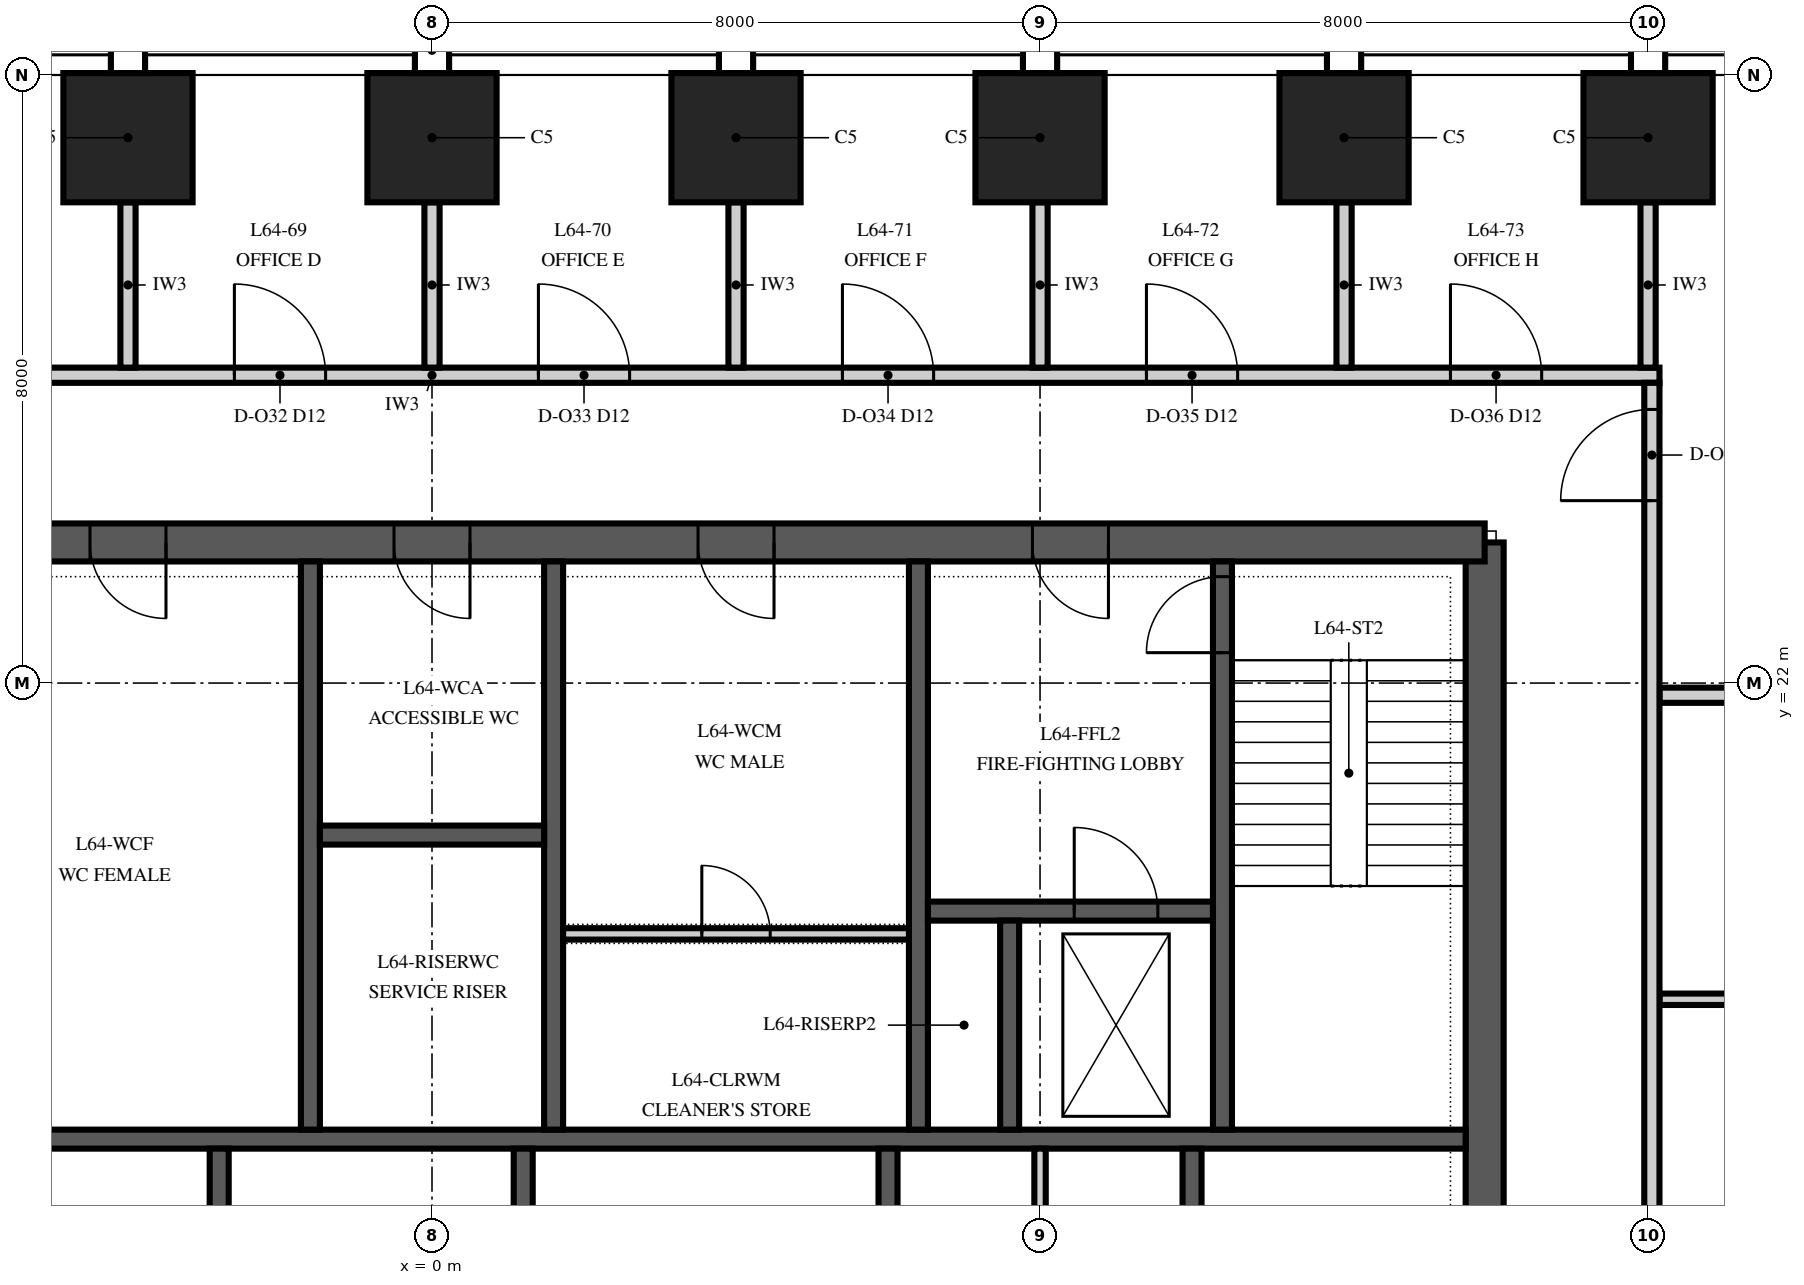
"""IFC4 building model, lengths in metres.
Left out: names, types, materials, properties, quantities, classifications, styles, units other than length and angle.
Written with IfcOpenShell. Run it as: python <this file> out.ifc"""

import sys

from ifc_helpers import new_model, si_unit, direction, frame, frame_2d, origin, origin_2d, place, context, subcontext, project, spatial, polyline, rectangle, outline, extrude, element, fill, save


model = new_model("IFC4")
c1 = context("Model", 3, precision=1e-05, world=origin(), true_north=direction((0.0, 1.0)))
c2 = subcontext(c1, "Body", "Model", "MODEL_VIEW")
j1 = project(units=[si_unit("LENGTHUNIT", "METRE"), si_unit("PLANEANGLEUNIT", "RADIAN")], contexts=[c1])
p1 = place(None, origin())
s1 = spatial("IfcSite", under=j1, at=p1, CompositionType="ELEMENT")
p2 = place(p1, origin())
s2 = spatial("IfcBuilding", under=s1, at=p2, CompositionType="ELEMENT")
p3 = place(p2, frame((0.0, 0.0, 276.0)))
s3 = spatial("IfcBuildingStorey", under=s2, at=p3, CompositionType="ELEMENT", Elevation=276.0)
for number, where, z_axis, x_axis in (
    (1, (16.0, 29.175, 0.0), (0.0, 0.0, 1.0), (-1.0, 0.0, 0.0)),
    (2, (12.0, 29.175, 0.0), (0.0, 0.0, 1.0), (-1.0, 0.0, 0.0)),
    (3, (8.0, 29.175, 0.0), (0.0, 0.0, 1.0), (-1.0, 0.0, 0.0)),
    (4, (4.0, 29.175, 0.0), (0.0, 0.0, 1.0), (-1.0, 0.0, 0.0)),
    (5, (0.0, 29.175, 0.0), (0.0, 0.0, 1.0), (-1.0, 0.0, 0.0)),
    (6, (-4.0, 29.175, 0.0), (0.0, 0.0, 1.0), (-1.0, 0.0, 0.0)),
):
    element("IfcColumn", number, at=place(p3, frame(where, z_axis=z_axis, x_axis=x_axis)), inside=s3, PredefinedType="COLUMN", context=c2, shape_type="SweptSolid", body=[
        extrude(rectangle(XDim=1.7, YDim=1.7, at=origin_2d()), origin(), (0.0, 0.0, 1.0), 4.0),
    ])
p4 = place(p3, frame((13.85, 6.15, 0.0), z_axis=(0.0, 0.0, 1.0), x_axis=(0.0, 1.0, 0.0)))
e7 = element("IfcWall", 7, at=p4, inside=s3, PredefinedType="SHEAR", context=c2, shape_type="SweptSolid", body=[
    extrude(outline(polyline([(0.0, -0.25), (17.7, -0.25), (17.7, 0.0), (17.45, 0.0), (17.45, 0.25), (0.25, 0.25), (0.25, 0.0), (0.0, 0.0), (0.0, -0.25)])), origin(), (0.0, 0.0, 1.0), 4.0),
])
p5 = place(p4, frame((4.15, 0.0, 0.0)))
e8 = element("IfcOpeningElement", 8, at=p5, cuts=e7, PredefinedType="OPENING", context=c2, shape_type="SweptSolid", body=[
    extrude(rectangle(XDim=1.8, YDim=2.4, at=frame_2d((0.9, 1.2))), frame((0.0, 0.265, 0.0), z_axis=(0.0, -1.0, 0.0), x_axis=(1.0, 0.0, 0.0)), (0.0, 0.0, 1.0), 0.53),
])
p6 = place(p3, frame((13.85, 23.85, 0.0), z_axis=(0.0, 0.0, 1.0), x_axis=(-1.0, 0.0, 0.0)))
e9 = element("IfcWall", 9, at=p6, inside=s3, PredefinedType="SHEAR", context=c2, shape_type="SweptSolid", body=[
    extrude(rectangle(XDim=27.7, YDim=0.5, at=frame_2d((13.85, 0.0))), origin(), (0.0, 0.0, 1.0), 4.0),
])
p7 = place(p6, frame((21.75, 0.0, 0.0)))
e10 = element("IfcOpeningElement", 10, at=p7, cuts=e9, PredefinedType="OPENING", context=c2, shape_type="SweptSolid", body=[
    extrude(rectangle(XDim=1.0, YDim=2.1, at=frame_2d((0.5, 1.05))), frame((0.0, 0.265, 0.0), z_axis=(0.0, -1.0, 0.0), x_axis=(1.0, 0.0, 0.0)), (0.0, 0.0, 1.0), 0.53),
])
p8 = place(p6, frame((4.95, 0.0, 0.0)))
e11 = element("IfcOpeningElement", 11, at=p8, cuts=e9, PredefinedType="OPENING", context=c2, shape_type="SweptSolid", body=[
    extrude(rectangle(XDim=1.0, YDim=2.1, at=frame_2d((0.5, 1.05))), frame((0.0, 0.265, 0.0), z_axis=(0.0, -1.0, 0.0), x_axis=(1.0, 0.0, 0.0)), (0.0, 0.0, 1.0), 0.53),
])
p9 = place(p6, frame((17.35, 0.0, 0.0)))
e12 = element("IfcOpeningElement", 12, at=p9, cuts=e9, PredefinedType="OPENING", context=c2, shape_type="SweptSolid", body=[
    extrude(rectangle(XDim=1.0, YDim=2.1, at=frame_2d((0.5, 1.05))), frame((0.0, 0.265, 0.0), z_axis=(0.0, -1.0, 0.0), x_axis=(1.0, 0.0, 0.0)), (0.0, 0.0, 1.0), 0.53),
])
p10 = place(p6, frame((13.35, 0.0, 0.0)))
e13 = element("IfcOpeningElement", 13, at=p10, cuts=e9, PredefinedType="OPENING", context=c2, shape_type="SweptSolid", body=[
    extrude(rectangle(XDim=1.0, YDim=2.1, at=frame_2d((0.5, 1.05))), frame((0.0, 0.265, 0.0), z_axis=(0.0, -1.0, 0.0), x_axis=(1.0, 0.0, 0.0)), (0.0, 0.0, 1.0), 0.53),
])
p11 = place(p6, frame((9.35, 0.0, 0.0)))
e14 = element("IfcOpeningElement", 14, at=p11, cuts=e9, PredefinedType="OPENING", context=c2, shape_type="SweptSolid", body=[
    extrude(rectangle(XDim=1.0, YDim=2.1, at=frame_2d((0.5, 1.05))), frame((0.0, 0.265, 0.0), z_axis=(0.0, -1.0, 0.0), x_axis=(1.0, 0.0, 0.0)), (0.0, 0.0, 1.0), 0.53),
])
p12 = place(p3, frame((-13.6, 16.0, 0.0), z_axis=(0.0, 0.0, 1.0), x_axis=(1.0, 0.0, 0.0)))
e15 = element("IfcWall", 15, at=p12, inside=s3, PredefinedType="SHEAR", context=c2, shape_type="SweptSolid", body=[
    extrude(rectangle(XDim=27.2, YDim=0.25, at=frame_2d((13.6, 0.0))), origin(), (0.0, 0.0, 1.0), 4.0),
])
for number, where, z_axis, x_axis in (
    (16, (-2.8, 13.125, 0.0), (0.0, 0.0, 1.0), (0.0, 1.0, 0.0)),
    (17, (1.2, 13.125, 0.0), (0.0, 0.0, 1.0), (0.0, 1.0, 0.0)),
    (18, (6.0, 13.125, 0.0), (0.0, 0.0, 1.0), (0.0, 1.0, 0.0)),
    (19, (10.0, 13.125, 0.0), (0.0, 0.0, 1.0), (0.0, 1.0, 0.0)),
):
    element("IfcWall", number, at=place(p3, frame(where, z_axis=z_axis, x_axis=x_axis)), inside=s3, PredefinedType="SHEAR", context=c2, shape_type="SweptSolid", body=[
        extrude(rectangle(XDim=2.75, YDim=0.25, at=frame_2d((1.375, 0.0))), origin(), (0.0, 0.0, 1.0), 4.0),
    ])
for number, where, z_axis, x_axis in (
    (20, (-1.6, 16.125, 0.0), (0.0, 0.0, 1.0), (0.0, 1.0, 0.0)),
    (21, (1.6, 16.125, 0.0), (0.0, 0.0, 1.0), (0.0, 1.0, 0.0)),
    (22, (6.4, 16.125, 0.0), (0.0, 0.0, 1.0), (0.0, 1.0, 0.0)),
):
    element("IfcWall", number, at=place(p3, frame(where, z_axis=z_axis, x_axis=x_axis)), inside=s3, PredefinedType="SHEAR", context=c2, shape_type="SweptSolid", body=[
        extrude(rectangle(XDim=7.475, YDim=0.25, at=frame_2d((3.738, 0.0))), origin(), (0.0, 0.0, 1.0), 4.0),
    ])
p13 = place(p3, frame((10.4, 16.125, 0.0), z_axis=(0.0, 0.0, 1.0), x_axis=(0.0, 1.0, 0.0)))
e23 = element("IfcWall", 23, at=p13, inside=s3, PredefinedType="SHEAR", context=c2, shape_type="SweptSolid", body=[
    extrude(rectangle(XDim=7.475, YDim=0.25, at=frame_2d((3.738, 0.0))), origin(), (0.0, 0.0, 1.0), 4.0),
])
p14 = place(p13, frame((6.275, 0.0, 0.0)))
e24 = element("IfcOpeningElement", 24, at=p14, cuts=e23, PredefinedType="OPENING", context=c2, shape_type="SweptSolid", body=[
    extrude(rectangle(XDim=1.0, YDim=2.1, at=frame_2d((0.5, 1.05))), frame((0.0, 0.14, 0.0), z_axis=(0.0, -1.0, 0.0), x_axis=(1.0, 0.0, 0.0)), (0.0, 0.0, 1.0), 0.28),
])
p15 = place(p3, frame((6.525, 19.0, 0.0), z_axis=(0.0, 0.0, 1.0), x_axis=(1.0, 0.0, 0.0)))
e25 = element("IfcWall", 25, at=p15, inside=s3, PredefinedType="SHEAR", context=c2, shape_type="SweptSolid", body=[
    extrude(rectangle(XDim=3.75, YDim=0.25, at=frame_2d((1.875, 0.0))), origin(), (0.0, 0.0, 1.0), 4.0),
])
p16 = place(p15, frame((1.925, 0.0, 0.0)))
e26 = element("IfcOpeningElement", 26, at=p16, cuts=e25, PredefinedType="OPENING", context=c2, shape_type="SweptSolid", body=[
    extrude(rectangle(XDim=1.1, YDim=2.1, at=frame_2d((0.55, 1.05))), frame((0.0, 0.14, 0.0), z_axis=(0.0, -1.0, 0.0), x_axis=(1.0, 0.0, 0.0)), (0.0, 0.0, 1.0), 0.28),
])
p17 = place(p3, frame((7.6, 16.125, 0.0), z_axis=(0.0, 0.0, 1.0), x_axis=(0.0, 1.0, 0.0)))
e27 = element("IfcWall", 27, at=p17, inside=s3, PredefinedType="SHEAR", context=c2, shape_type="SweptSolid", body=[
    extrude(rectangle(XDim=2.75, YDim=0.25, at=frame_2d((1.375, 0.0))), origin(), (0.0, 0.0, 1.0), 4.0),
])
p18 = place(p3, frame((-1.475, 20.0, 0.0), z_axis=(0.0, 0.0, 1.0), x_axis=(1.0, 0.0, 0.0)))
e28 = element("IfcWall", 28, at=p18, inside=s3, PredefinedType="SHEAR", context=c2, shape_type="SweptSolid", body=[
    extrude(rectangle(XDim=2.95, YDim=0.25, at=frame_2d((1.475, 0.0))), origin(), (0.0, 0.0, 1.0), 4.0),
])
p19 = place(p3, frame((1.725, 18.7, 0.0), z_axis=(0.0, 0.0, 1.0), x_axis=(1.0, 0.0, 0.0)))
e29 = element("IfcWall", 29, at=p19, inside=s3, PredefinedType="PARTITIONING", context=c2, shape_type="SweptSolid", body=[
    extrude(rectangle(XDim=4.55, YDim=0.15, at=frame_2d((2.275, 0.0))), origin(), (0.0, 0.0, 1.0), 3.85),
])
p20 = place(p19, frame((1.825, 0.0, 0.0)))
e30 = element("IfcOpeningElement", 30, at=p20, cuts=e29, PredefinedType="OPENING", context=c2, shape_type="SweptSolid", body=[
    extrude(rectangle(XDim=0.9, YDim=2.1, at=frame_2d((0.45, 1.05))), frame((0.0, 0.09, 0.0), z_axis=(0.0, -1.0, 0.0), x_axis=(1.0, 0.0, 0.0)), (0.0, 0.0, 1.0), 0.18),
])
p21 = place(p3, frame((8.0, 13.125, 0.0), z_axis=(0.0, 0.0, 1.0), x_axis=(0.0, 1.0, 0.0)))
e31 = element("IfcWall", 31, at=p21, inside=s3, PredefinedType="PARTITIONING", context=c2, shape_type="SweptSolid", body=[
    extrude(rectangle(XDim=2.75, YDim=0.15, at=frame_2d((1.375, 0.0))), origin(), (0.0, 0.0, 1.0), 3.85),
])
p22 = place(p3, frame((16.15, 17.84, 0.0), z_axis=(0.0, 0.0, 1.0), x_axis=(1.0, 0.0, 0.0)))
e32 = element("IfcWall", 32, at=p22, inside=s3, PredefinedType="PARTITIONING", context=c2, shape_type="SweptSolid", body=[
    extrude(rectangle(XDim=3.575, YDim=0.15, at=frame_2d((1.788, 0.0))), origin(), (0.0, 0.0, 1.0), 3.23),
])
p23 = place(p3, frame((16.15, 21.84, 0.0), z_axis=(0.0, 0.0, 1.0), x_axis=(1.0, 0.0, 0.0)))
e33 = element("IfcWall", 33, at=p23, inside=s3, PredefinedType="PARTITIONING", context=c2, shape_type="SweptSolid", body=[
    extrude(rectangle(XDim=7.174, YDim=0.2, at=frame_2d((3.587, 0.0))), origin(), (0.0, 0.0, 1.0), 3.23),
])
p24 = place(p3, frame((-16.15, 26.05, 0.0), z_axis=(0.0, 0.0, 1.0), x_axis=(1.0, 0.0, 0.0)))
e34 = element("IfcWall", 34, at=p24, inside=s3, PredefinedType="PARTITIONING", context=c2, shape_type="SweptSolid", body=[
    extrude(rectangle(XDim=32.3, YDim=0.2, at=frame_2d((16.15, 0.0))), origin(), (0.0, 0.0, 1.0), 3.418),
])
p25 = place(p24, frame((1.55, 0.0, 0.0)))
e35 = element("IfcOpeningElement", 35, at=p25, cuts=e34, PredefinedType="OPENING", context=c2, shape_type="SweptSolid", body=[
    extrude(rectangle(XDim=1.2, YDim=2.4, at=frame_2d((0.6, 1.2))), frame((0.0, 0.115, 0.0), z_axis=(0.0, -1.0, 0.0), x_axis=(1.0, 0.0, 0.0)), (0.0, 0.0, 1.0), 0.23),
])
p26 = place(p24, frame((5.55, 0.0, 0.0)))
e36 = element("IfcOpeningElement", 36, at=p26, cuts=e34, PredefinedType="OPENING", context=c2, shape_type="SweptSolid", body=[
    extrude(rectangle(XDim=1.2, YDim=2.4, at=frame_2d((0.6, 1.2))), frame((0.0, 0.115, 0.0), z_axis=(0.0, -1.0, 0.0), x_axis=(1.0, 0.0, 0.0)), (0.0, 0.0, 1.0), 0.23),
])
p27 = place(p24, frame((9.55, 0.0, 0.0)))
e37 = element("IfcOpeningElement", 37, at=p27, cuts=e34, PredefinedType="OPENING", context=c2, shape_type="SweptSolid", body=[
    extrude(rectangle(XDim=1.2, YDim=2.4, at=frame_2d((0.6, 1.2))), frame((0.0, 0.115, 0.0), z_axis=(0.0, -1.0, 0.0), x_axis=(1.0, 0.0, 0.0)), (0.0, 0.0, 1.0), 0.23),
])
p28 = place(p24, frame((13.55, 0.0, 0.0)))
e38 = element("IfcOpeningElement", 38, at=p28, cuts=e34, PredefinedType="OPENING", context=c2, shape_type="SweptSolid", body=[
    extrude(rectangle(XDim=1.2, YDim=2.4, at=frame_2d((0.6, 1.2))), frame((0.0, 0.115, 0.0), z_axis=(0.0, -1.0, 0.0), x_axis=(1.0, 0.0, 0.0)), (0.0, 0.0, 1.0), 0.23),
])
p29 = place(p24, frame((17.55, 0.0, 0.0)))
e39 = element("IfcOpeningElement", 39, at=p29, cuts=e34, PredefinedType="OPENING", context=c2, shape_type="SweptSolid", body=[
    extrude(rectangle(XDim=1.2, YDim=2.4, at=frame_2d((0.6, 1.2))), frame((0.0, 0.115, 0.0), z_axis=(0.0, -1.0, 0.0), x_axis=(1.0, 0.0, 0.0)), (0.0, 0.0, 1.0), 0.23),
])
p30 = place(p24, frame((21.55, 0.0, 0.0)))
e40 = element("IfcOpeningElement", 40, at=p30, cuts=e34, PredefinedType="OPENING", context=c2, shape_type="SweptSolid", body=[
    extrude(rectangle(XDim=1.2, YDim=2.4, at=frame_2d((0.6, 1.2))), frame((0.0, 0.115, 0.0), z_axis=(0.0, -1.0, 0.0), x_axis=(1.0, 0.0, 0.0)), (0.0, 0.0, 1.0), 0.23),
])
p31 = place(p24, frame((25.55, 0.0, 0.0)))
e41 = element("IfcOpeningElement", 41, at=p31, cuts=e34, PredefinedType="OPENING", context=c2, shape_type="SweptSolid", body=[
    extrude(rectangle(XDim=1.2, YDim=2.4, at=frame_2d((0.6, 1.2))), frame((0.0, 0.115, 0.0), z_axis=(0.0, -1.0, 0.0), x_axis=(1.0, 0.0, 0.0)), (0.0, 0.0, 1.0), 0.23),
])
p32 = place(p24, frame((29.55, 0.0, 0.0)))
e42 = element("IfcOpeningElement", 42, at=p32, cuts=e34, PredefinedType="OPENING", context=c2, shape_type="SweptSolid", body=[
    extrude(rectangle(XDim=1.2, YDim=2.4, at=frame_2d((0.6, 1.2))), frame((0.0, 0.115, 0.0), z_axis=(0.0, -1.0, 0.0), x_axis=(1.0, 0.0, 0.0)), (0.0, 0.0, 1.0), 0.23),
])
for number, where, z_axis, x_axis in (
    (43, (-4.0, 26.15, 0.0), (0.0, 0.0, 1.0), (0.0, 1.0, 0.0)),
    (44, (0.0, 26.15, 0.0), (0.0, 0.0, 1.0), (0.0, 1.0, 0.0)),
    (45, (4.0, 26.15, 0.0), (0.0, 0.0, 1.0), (0.0, 1.0, 0.0)),
    (46, (8.0, 26.15, 0.0), (0.0, 0.0, 1.0), (0.0, 1.0, 0.0)),
    (47, (12.0, 26.15, 0.0), (0.0, 0.0, 1.0), (0.0, 1.0, 0.0)),
    (48, (16.0, 26.15, 0.0), (0.0, 0.0, 1.0), (0.0, 1.0, 0.0)),
):
    element("IfcWall", number, at=place(p3, frame(where, z_axis=z_axis, x_axis=x_axis)), inside=s3, PredefinedType="PARTITIONING", context=c2, shape_type="SweptSolid", body=[
        extrude(rectangle(XDim=2.175, YDim=0.2, at=frame_2d((1.087, 0.0))), origin(), (0.0, 0.0, 1.0), 3.418),
    ])
p33 = place(p3, frame((16.05, 1.94, 0.0), z_axis=(0.0, 0.0, 1.0), x_axis=(0.0, 1.0, 0.0)))
e49 = element("IfcWall", 49, at=p33, inside=s3, PredefinedType="PARTITIONING", context=c2, shape_type="SweptSolid", body=[
    extrude(rectangle(XDim=24.01, YDim=0.2, at=frame_2d((12.005, 0.0))), origin(), (0.0, 0.0, 1.0), 2.842),
])
p34 = place(p33, frame((8.46, 0.0, 0.0)))
e50 = element("IfcOpeningElement", 50, at=p34, cuts=e49, PredefinedType="OPENING", context=c2, shape_type="SweptSolid", body=[
    extrude(rectangle(XDim=1.2, YDim=2.4, at=frame_2d((0.6, 1.2))), frame((0.0, 0.115, 0.0), z_axis=(0.0, -1.0, 0.0), x_axis=(1.0, 0.0, 0.0)), (0.0, 0.0, 1.0), 0.23),
])
p35 = place(p33, frame((22.46, 0.0, 0.0)))
e51 = element("IfcOpeningElement", 51, at=p35, cuts=e49, PredefinedType="OPENING", context=c2, shape_type="SweptSolid", body=[
    extrude(rectangle(XDim=1.2, YDim=2.4, at=frame_2d((0.6, 1.2))), frame((0.0, 0.115, 0.0), z_axis=(0.0, -1.0, 0.0), x_axis=(1.0, 0.0, 0.0)), (0.0, 0.0, 1.0), 0.23),
])
p36 = place(p8, origin())
e52 = element("IfcDoor", 52, at=p36, inside=s3, OperationType="SINGLE_SWING_RIGHT", PredefinedType="DOOR", context=c2, shape_type="SweptSolid", body=[
    extrude(rectangle(XDim=1.0, YDim=2.1, at=frame_2d((0.5, 1.05))), frame((0.0, 0.25, 0.0), z_axis=(0.0, -1.0, 0.0), x_axis=(1.0, 0.0, 0.0)), (0.0, 0.0, 1.0), 0.5),
])
fill(e11, e52)
p37 = place(p9, origin())
e53 = element("IfcDoor", 53, at=p37, inside=s3, OperationType="SINGLE_SWING_LEFT", PredefinedType="DOOR", context=c2, shape_type="SweptSolid", body=[
    extrude(rectangle(XDim=1.0, YDim=2.1, at=frame_2d((0.5, 1.05))), frame((0.0, 0.25, 0.0), z_axis=(0.0, -1.0, 0.0), x_axis=(1.0, 0.0, 0.0)), (0.0, 0.0, 1.0), 0.5),
])
fill(e12, e53)
p38 = place(p10, origin())
e54 = element("IfcDoor", 54, at=p38, inside=s3, OperationType="SINGLE_SWING_LEFT", PredefinedType="DOOR", context=c2, shape_type="SweptSolid", body=[
    extrude(rectangle(XDim=1.0, YDim=2.1, at=frame_2d((0.5, 1.05))), frame((0.0, 0.25, 0.0), z_axis=(0.0, -1.0, 0.0), x_axis=(1.0, 0.0, 0.0)), (0.0, 0.0, 1.0), 0.5),
])
fill(e13, e54)
p39 = place(p11, origin())
e55 = element("IfcDoor", 55, at=p39, inside=s3, OperationType="SINGLE_SWING_LEFT", PredefinedType="DOOR", context=c2, shape_type="SweptSolid", body=[
    extrude(rectangle(XDim=1.0, YDim=2.1, at=frame_2d((0.5, 1.05))), frame((0.0, 0.25, 0.0), z_axis=(0.0, -1.0, 0.0), x_axis=(1.0, 0.0, 0.0)), (0.0, 0.0, 1.0), 0.5),
])
fill(e14, e55)
p40 = place(p14, origin())
e56 = element("IfcDoor", 56, at=p40, inside=s3, OperationType="SINGLE_SWING_LEFT", PredefinedType="DOOR", context=c2, shape_type="SweptSolid", body=[
    extrude(rectangle(XDim=1.0, YDim=2.1, at=frame_2d((0.5, 1.05))), frame((0.0, 0.125, 0.0), z_axis=(0.0, -1.0, 0.0), x_axis=(1.0, 0.0, 0.0)), (0.0, 0.0, 1.0), 0.25),
])
fill(e24, e56)
p41 = place(p16, origin())
e57 = element("IfcDoor", 57, at=p41, inside=s3, OperationType="SLIDING_TO_RIGHT", PredefinedType="DOOR", context=c2, shape_type="SweptSolid", body=[
    extrude(rectangle(XDim=1.1, YDim=2.1, at=frame_2d((0.55, 1.05))), frame((0.0, 0.125, 0.0), z_axis=(0.0, -1.0, 0.0), x_axis=(1.0, 0.0, 0.0)), (0.0, 0.0, 1.0), 0.25),
])
fill(e26, e57)
p42 = place(p20, origin())
e58 = element("IfcDoor", 58, at=p42, inside=s3, OperationType="SINGLE_SWING_LEFT", PredefinedType="DOOR", context=c2, shape_type="SweptSolid", body=[
    extrude(rectangle(XDim=0.9, YDim=2.1, at=frame_2d((0.45, 1.05))), frame((0.0, 0.075, 0.0), z_axis=(0.0, -1.0, 0.0), x_axis=(1.0, 0.0, 0.0)), (0.0, 0.0, 1.0), 0.149),
])
fill(e30, e58)
p43 = place(p28, origin())
e59 = element("IfcDoor", 59, at=p43, inside=s3, OperationType="SINGLE_SWING_LEFT", PredefinedType="DOOR", context=c2, shape_type="SweptSolid", body=[
    extrude(rectangle(XDim=1.2, YDim=2.4, at=frame_2d((0.6, 1.2))), frame((0.0, 0.1, 0.0), z_axis=(0.0, -1.0, 0.0), x_axis=(1.0, 0.0, 0.0)), (0.0, 0.0, 1.0), 0.199),
])
fill(e38, e59)
p44 = place(p29, origin())
e60 = element("IfcDoor", 60, at=p44, inside=s3, OperationType="SINGLE_SWING_LEFT", PredefinedType="DOOR", context=c2, shape_type="SweptSolid", body=[
    extrude(rectangle(XDim=1.2, YDim=2.4, at=frame_2d((0.6, 1.2))), frame((0.0, 0.1, 0.0), z_axis=(0.0, -1.0, 0.0), x_axis=(1.0, 0.0, 0.0)), (0.0, 0.0, 1.0), 0.199),
])
fill(e39, e60)
p45 = place(p30, origin())
e61 = element("IfcDoor", 61, at=p45, inside=s3, OperationType="SINGLE_SWING_LEFT", PredefinedType="DOOR", context=c2, shape_type="SweptSolid", body=[
    extrude(rectangle(XDim=1.2, YDim=2.4, at=frame_2d((0.6, 1.2))), frame((0.0, 0.1, 0.0), z_axis=(0.0, -1.0, 0.0), x_axis=(1.0, 0.0, 0.0)), (0.0, 0.0, 1.0), 0.199),
])
fill(e40, e61)
p46 = place(p31, origin())
e62 = element("IfcDoor", 62, at=p46, inside=s3, OperationType="SINGLE_SWING_LEFT", PredefinedType="DOOR", context=c2, shape_type="SweptSolid", body=[
    extrude(rectangle(XDim=1.2, YDim=2.4, at=frame_2d((0.6, 1.2))), frame((0.0, 0.1, 0.0), z_axis=(0.0, -1.0, 0.0), x_axis=(1.0, 0.0, 0.0)), (0.0, 0.0, 1.0), 0.199),
])
fill(e41, e62)
p47 = place(p32, origin())
e63 = element("IfcDoor", 63, at=p47, inside=s3, OperationType="SINGLE_SWING_LEFT", PredefinedType="DOOR", context=c2, shape_type="SweptSolid", body=[
    extrude(rectangle(XDim=1.2, YDim=2.4, at=frame_2d((0.6, 1.2))), frame((0.0, 0.1, 0.0), z_axis=(0.0, -1.0, 0.0), x_axis=(1.0, 0.0, 0.0)), (0.0, 0.0, 1.0), 0.199),
])
fill(e42, e63)
p48 = place(p35, origin())
e64 = element("IfcDoor", 64, at=p48, inside=s3, OperationType="SINGLE_SWING_LEFT", PredefinedType="DOOR", context=c2, shape_type="SweptSolid", body=[
    extrude(rectangle(XDim=1.2, YDim=2.4, at=frame_2d((0.6, 1.2))), frame((0.0, 0.1, 0.0), z_axis=(0.0, -1.0, 0.0), x_axis=(1.0, 0.0, 0.0)), (0.0, 0.0, 1.0), 0.199),
])
fill(e51, e64)
save(model, sys.argv[1])
